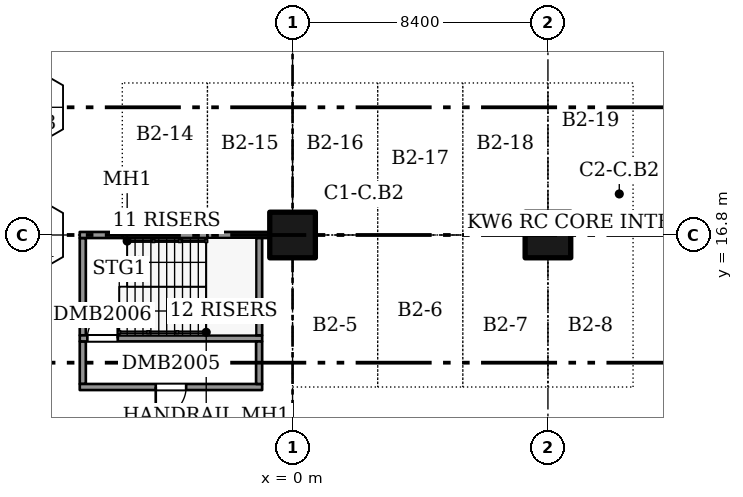
"""IFC4 building model, lengths in metres.
Left out: names, types, materials, properties, quantities, classifications, styles, units other than length and angle.
Written with IfcOpenShell. Run it as: python <this file> out.ifc"""

import sys

from ifc_helpers import new_model, si_unit, direction, frame, frame_2d, origin, origin_2d, place, context, subcontext, project, spatial, rectangle, extrude, element, fill, save


model = new_model("IFC4")
c1 = context("Model", 3, precision=1e-05, world=origin(), true_north=direction((0.0, 1.0)))
c2 = subcontext(c1, "Body", "Model", "MODEL_VIEW")
j1 = project(units=[si_unit("LENGTHUNIT", "METRE"), si_unit("PLANEANGLEUNIT", "RADIAN")], contexts=[c1])
p1 = place(None, origin())
s1 = spatial("IfcSite", under=j1, at=p1, CompositionType="ELEMENT")
p2 = place(p1, origin())
s2 = spatial("IfcBuilding", under=s1, at=p2, CompositionType="ELEMENT")
p3 = place(p2, frame((0.0, 0.0, -8.0)))
s3 = spatial("IfcBuildingStorey", under=s2, at=p3, CompositionType="ELEMENT", Elevation=-8.0)
for number, where, z_axis, x_axis in (
    (1, (0.0, 16.8, 0.0), (0.0, 0.0, 1.0), (1.0, 0.0, 0.0)),
    (2, (8.4, 16.8, 0.0), (0.0, 0.0, 1.0), (1.0, 0.0, 0.0)),
):
    element("IfcColumn", number, at=place(p3, frame(where, z_axis=z_axis, x_axis=x_axis)), inside=s3, PredefinedType="COLUMN", context=c2, shape_type="SweptSolid", body=[
        extrude(rectangle(XDim=1.5, YDim=1.5, at=origin_2d()), origin(), (0.0, 0.0, 1.0), 3.7),
    ])
p4 = place(p3, frame((-6.9, 11.9, 0.0), z_axis=(0.0, 0.0, 1.0), x_axis=(0.0, 1.0, 0.0)))
e3 = element("IfcWall", 3, at=p4, inside=s3, PredefinedType="SOLIDWALL", context=c2, shape_type="SweptSolid", body=[
    extrude(rectangle(XDim=1.4, YDim=0.2, at=frame_2d((0.7, 0.0))), origin(), (0.0, 0.0, 1.0), 3.7),
])
p5 = place(p3, frame((-7.0, 11.8, 0.0), z_axis=(0.0, 0.0, 1.0), x_axis=(1.0, 0.0, 0.0)))
e4 = element("IfcWall", 4, at=p5, inside=s3, PredefinedType="SOLIDWALL", context=c2, shape_type="SweptSolid", body=[
    extrude(rectangle(XDim=6.0, YDim=0.2, at=frame_2d((3.0, 0.0))), origin(), (0.0, 0.0, 1.0), 3.7),
])
p6 = place(p5, frame((2.5, 0.0, 0.0)))
e5 = element("IfcOpeningElement", 5, at=p6, cuts=e4, PredefinedType="OPENING", context=c2, shape_type="SweptSolid", body=[
    extrude(rectangle(XDim=1.0, YDim=2.1, at=frame_2d((0.5, 1.05))), frame((0.0, 0.11, 0.0), z_axis=(0.0, -1.0, 0.0), x_axis=(1.0, 0.0, 0.0)), (0.0, 0.0, 1.0), 0.22),
])
p7 = place(p3, frame((-6.9, 13.5, 0.0), z_axis=(0.0, 0.0, 1.0), x_axis=(0.0, 1.0, 0.0)))
e6 = element("IfcWall", 6, at=p7, inside=s3, PredefinedType="SOLIDWALL", context=c2, shape_type="SweptSolid", body=[
    extrude(rectangle(XDim=3.2, YDim=0.2, at=frame_2d((1.6, 0.0))), origin(), (0.0, 0.0, 1.0), 3.7),
])
p8 = place(p3, frame((-7.0, 13.4, 0.0), z_axis=(0.0, 0.0, 1.0), x_axis=(1.0, 0.0, 0.0)))
e7 = element("IfcWall", 7, at=p8, inside=s3, PredefinedType="SOLIDWALL", context=c2, shape_type="SweptSolid", body=[
    extrude(rectangle(XDim=6.0, YDim=0.2, at=frame_2d((3.0, 0.0))), origin(), (0.0, 0.0, 1.0), 3.7),
])
p9 = place(p8, frame((0.25, 0.0, 0.0)))
e8 = element("IfcOpeningElement", 8, at=p9, cuts=e7, PredefinedType="OPENING", context=c2, shape_type="SweptSolid", body=[
    extrude(rectangle(XDim=1.0, YDim=2.1, at=frame_2d((0.5, 1.05))), frame((0.0, 0.11, 0.0), z_axis=(0.0, -1.0, 0.0), x_axis=(1.0, 0.0, 0.0)), (0.0, 0.0, 1.0), 0.22),
])
p10 = place(p3, frame((-7.0, 16.8, 0.0), z_axis=(0.0, 0.0, 1.0), x_axis=(1.0, 0.0, 0.0)))
e9 = element("IfcWall", 9, at=p10, inside=s3, PredefinedType="SOLIDWALL", context=c2, shape_type="SweptSolid", body=[
    extrude(rectangle(XDim=1.4, YDim=0.2, at=frame_2d((0.7, 0.0))), origin(), (0.0, 0.0, 1.0), 3.7),
])
p11 = place(p3, frame((-5.6, 16.8, 0.0), z_axis=(0.0, 0.0, 1.0), x_axis=(1.0, 0.0, 0.0)))
e10 = element("IfcWall", 10, at=p11, inside=s3, PredefinedType="SOLIDWALL", context=c2, shape_type="SweptSolid", body=[
    extrude(rectangle(XDim=2.8, YDim=0.2, at=frame_2d((1.4, 0.0))), origin(), (0.0, 0.0, 1.0), 3.7),
])
p12 = place(p3, frame((-2.8, 16.8, 0.0), z_axis=(0.0, 0.0, 1.0), x_axis=(1.0, 0.0, 0.0)))
e11 = element("IfcWall", 11, at=p12, inside=s3, PredefinedType="SOLIDWALL", context=c2, shape_type="SweptSolid", body=[
    extrude(rectangle(XDim=2.05, YDim=0.2, at=frame_2d((1.025, 0.0))), origin(), (0.0, 0.0, 1.0), 3.7),
])
p13 = place(p3, frame((-1.1, 11.9, 0.0), z_axis=(0.0, 0.0, 1.0), x_axis=(0.0, 1.0, 0.0)))
e12 = element("IfcWall", 12, at=p13, inside=s3, PredefinedType="SOLIDWALL", context=c2, shape_type="SweptSolid", body=[
    extrude(rectangle(XDim=1.4, YDim=0.2, at=frame_2d((0.7, 0.0))), origin(), (0.0, 0.0, 1.0), 3.7),
])
p14 = place(p3, frame((-1.1, 13.5, 0.0), z_axis=(0.0, 0.0, 1.0), x_axis=(0.0, 1.0, 0.0)))
e13 = element("IfcWall", 13, at=p14, inside=s3, PredefinedType="SOLIDWALL", context=c2, shape_type="SweptSolid", body=[
    extrude(rectangle(XDim=3.2, YDim=0.2, at=frame_2d((1.6, 0.0))), origin(), (0.0, 0.0, 1.0), 3.7),
])
p15 = place(p6, frame((1.0, 0.0, 0.0), z_axis=(0.0, 0.0, 1.0), x_axis=(-1.0, 0.0, 0.0)))
e14 = element("IfcDoor", 14, at=p15, inside=s3, OperationType="SINGLE_SWING_RIGHT", PredefinedType="DOOR", context=c2, shape_type="SweptSolid", body=[
    extrude(rectangle(XDim=1.0, YDim=2.1, at=frame_2d((0.5, 1.05))), frame((0.0, 0.025, 0.0), z_axis=(0.0, -1.0, 0.0), x_axis=(1.0, 0.0, 0.0)), (0.0, 0.0, 1.0), 0.05),
])
fill(e5, e14)
p16 = place(p9, origin())
e15 = element("IfcDoor", 15, at=p16, inside=s3, OperationType="SINGLE_SWING_RIGHT", PredefinedType="DOOR", context=c2, shape_type="SweptSolid", body=[
    extrude(rectangle(XDim=1.0, YDim=2.1, at=frame_2d((0.5, 1.05))), frame((0.0, 0.025, 0.0), z_axis=(0.0, -1.0, 0.0), x_axis=(1.0, 0.0, 0.0)), (0.0, 0.0, 1.0), 0.05),
])
fill(e8, e15)
save(model, sys.argv[1])
